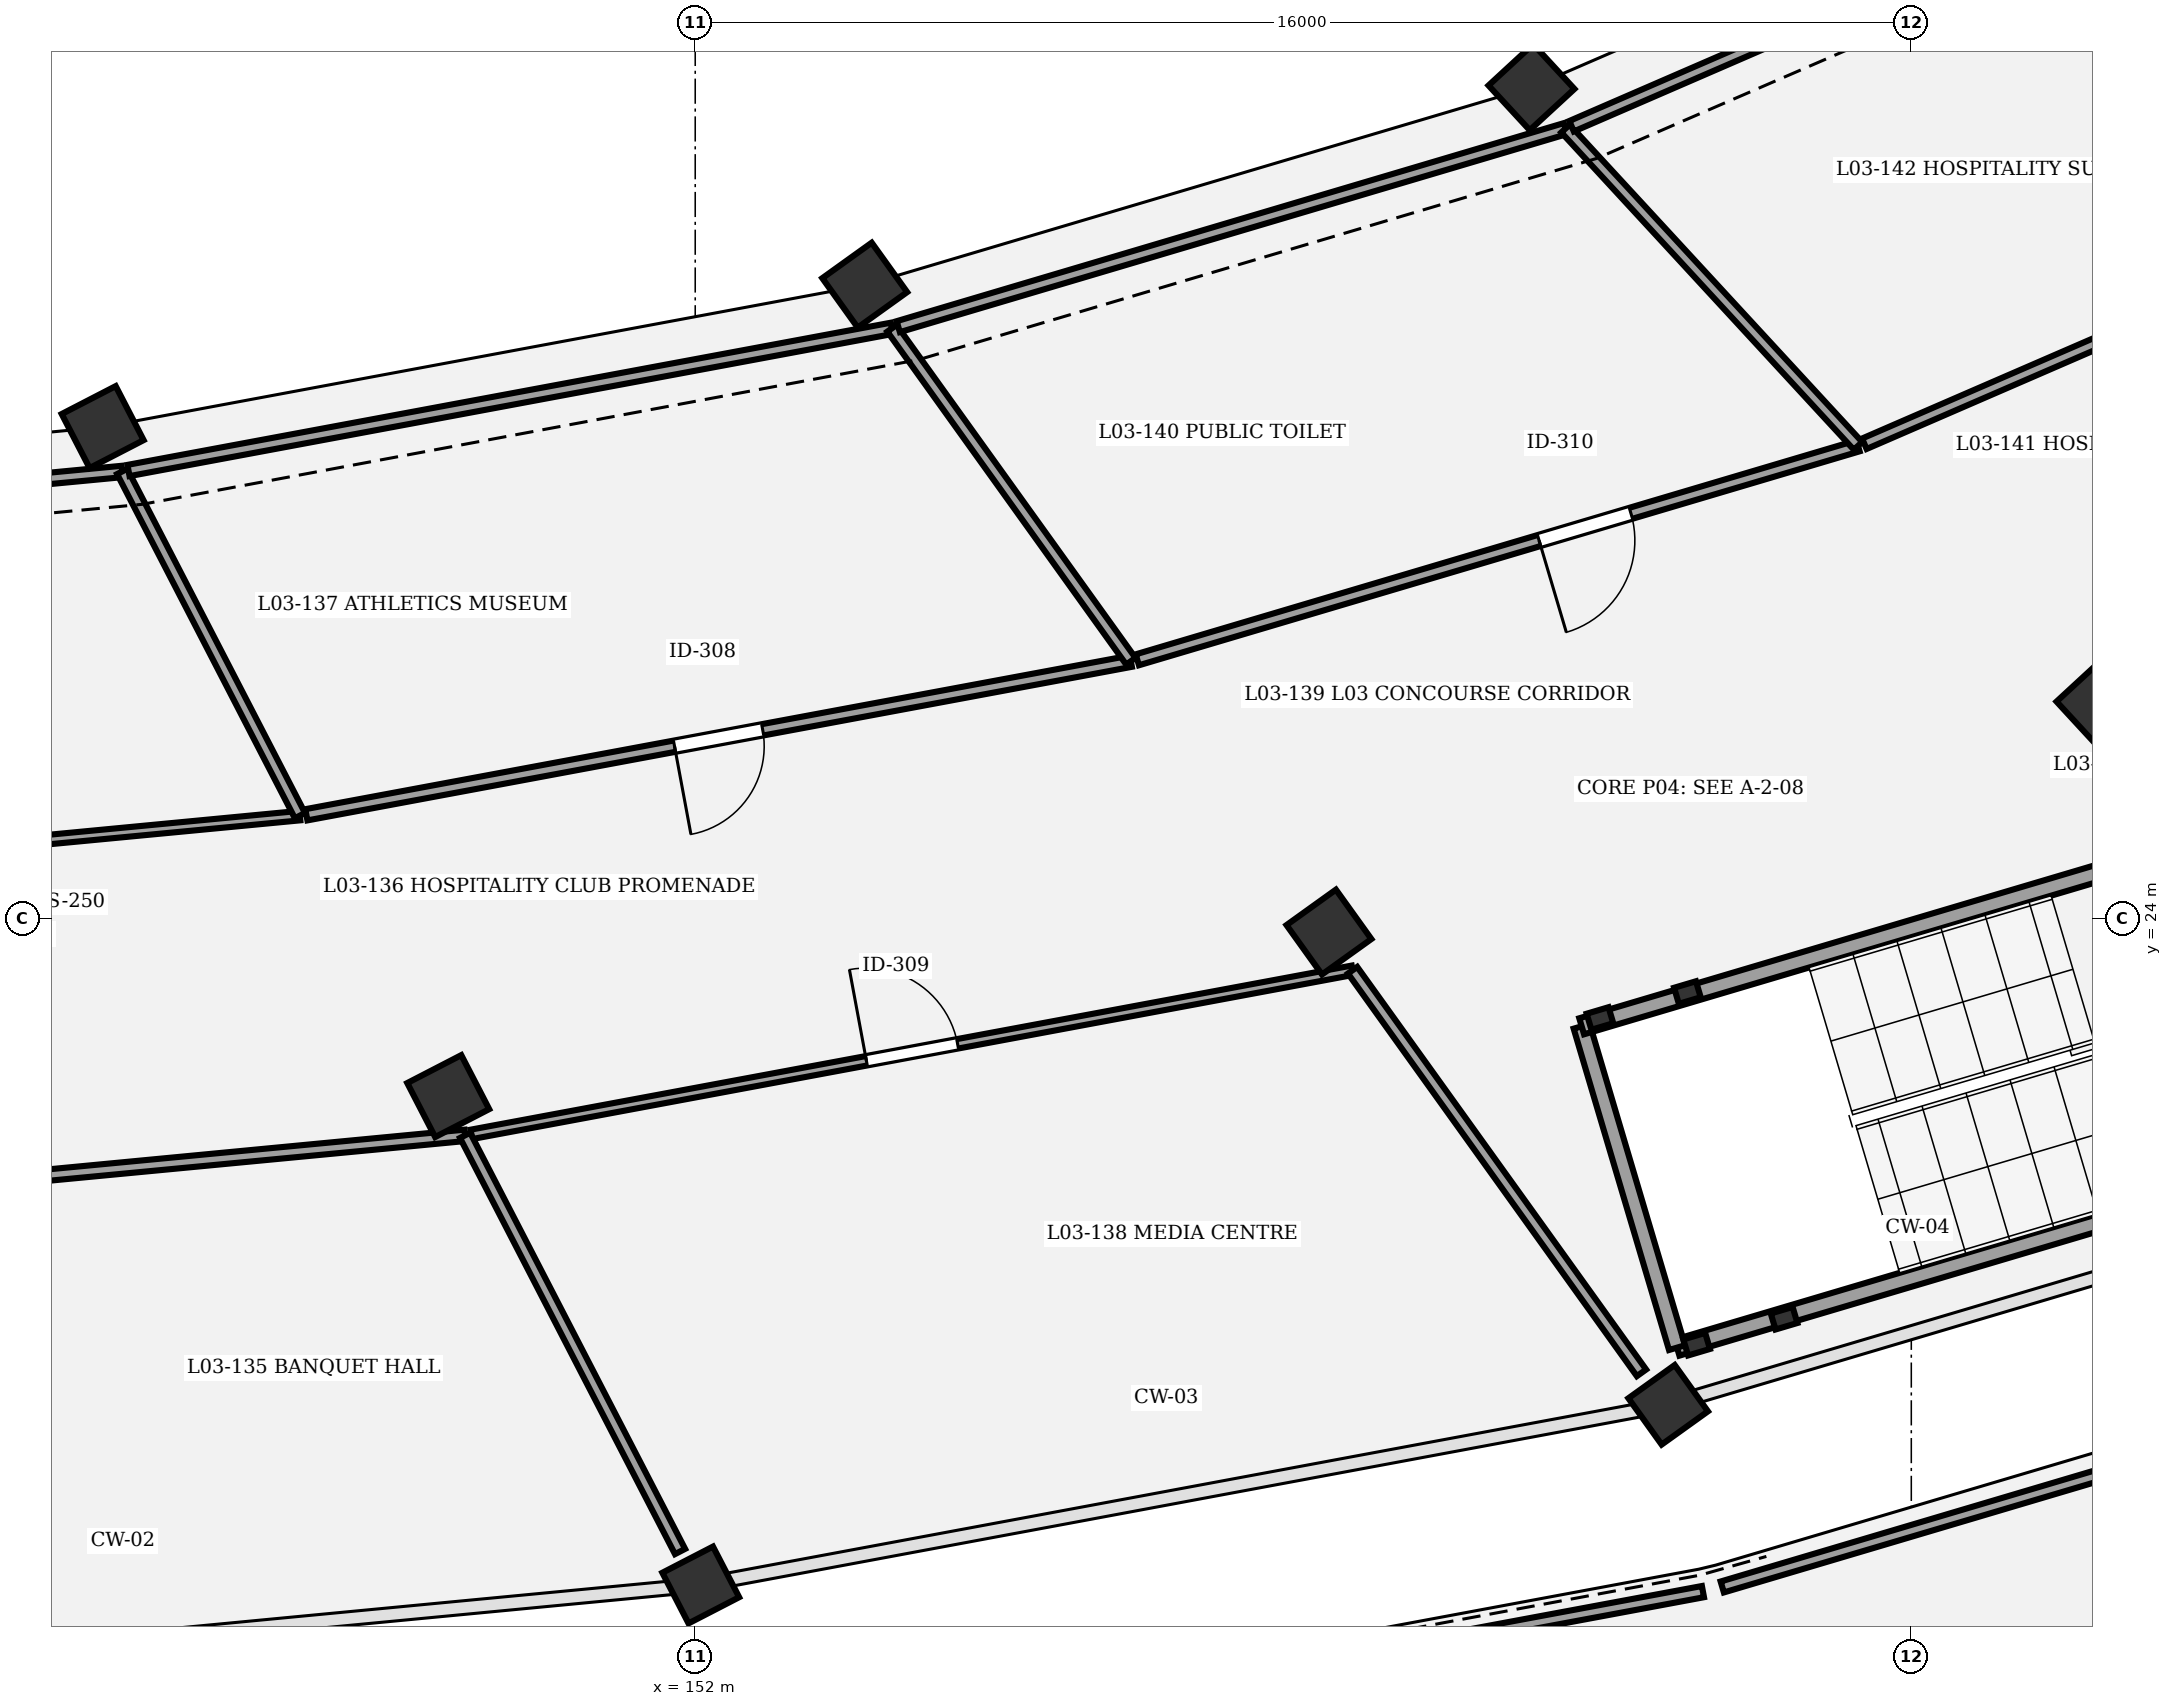
"""IFC4 building model, lengths in metres.
Left out: names, types, materials, properties, quantities, classifications, styles, units other than length and angle.
Written with IfcOpenShell. Run it as: python <this file> out.ifc"""

import sys

from ifc_helpers import new_model, si_unit, direction, frame, frame_2d, origin, origin_2d, place, context, subcontext, project, spatial, rectangle, extrude, element, fill, save


model = new_model("IFC4")
c1 = context("Model", 3, precision=1e-05, world=origin(), true_north=direction((0.0, 1.0)))
c2 = subcontext(c1, "Body", "Model", "MODEL_VIEW")
j1 = project(units=[si_unit("LENGTHUNIT", "METRE"), si_unit("PLANEANGLEUNIT", "RADIAN")], contexts=[c1])
p1 = place(None, origin())
s1 = spatial("IfcSite", under=j1, at=p1, CompositionType="ELEMENT")
p2 = place(p1, origin())
s2 = spatial("IfcBuilding", under=s1, at=p2, CompositionType="ELEMENT")
p3 = place(p2, frame((0.0, 0.0, 14.7)))
s3 = spatial("IfcBuildingStorey", under=s2, at=p3, CompositionType="ELEMENT", Elevation=14.7)
p4 = place(p3, frame((144.204, 30.466, 0.0), z_axis=(0.0, 0.0, 1.0), x_axis=(0.458959712465, -0.888457079624, 0.0)))
e1 = element("IfcColumn", 1, at=p4, inside=s3, PredefinedType="COLUMN", context=c2, shape_type="SweptSolid", body=[
    extrude(rectangle(XDim=0.8, YDim=0.8, at=origin_2d()), origin(), (0.0, 0.0, 1.0), 2.85),
])
p5 = place(p3, frame((148.75, 21.665, 0.0), z_axis=(0.0, 0.0, 1.0), x_axis=(0.458959712465, -0.888457079624, 0.0)))
e2 = element("IfcColumn", 2, at=p5, inside=s3, PredefinedType="COLUMN", context=c2, shape_type="SweptSolid", body=[
    extrude(rectangle(XDim=0.8, YDim=0.8, at=origin_2d()), origin(), (0.0, 0.0, 1.0), 4.5),
])
p6 = place(p3, frame((152.073, 15.233, 0.0), z_axis=(0.0, 0.0, 1.0), x_axis=(0.458959712465, -0.888457079624, 0.0)))
e3 = element("IfcColumn", 3, at=p6, inside=s3, PredefinedType="COLUMN", context=c2, shape_type="SweptSolid", body=[
    extrude(rectangle(XDim=0.75, YDim=0.75, at=origin_2d()), origin(), (0.0, 0.0, 1.0), 4.5),
])
p7 = place(p3, frame((154.23, 32.333, 0.0), z_axis=(0.0, 0.0, 1.0), x_axis=(0.582974127943, -0.812490717577, 0.0)))
e4 = element("IfcColumn", 4, at=p7, inside=s3, PredefinedType="COLUMN", context=c2, shape_type="SweptSolid", body=[
    extrude(rectangle(XDim=0.8, YDim=0.8, at=origin_2d()), origin(), (0.0, 0.0, 1.0), 2.85),
])
p8 = place(p3, frame((160.338, 23.823, 0.0), z_axis=(0.0, 0.0, 1.0), x_axis=(0.582974127943, -0.812490717577, 0.0)))
e5 = element("IfcColumn", 5, at=p8, inside=s3, PredefinedType="COLUMN", context=c2, shape_type="SweptSolid", body=[
    extrude(rectangle(XDim=0.8, YDim=0.8, at=origin_2d()), origin(), (0.0, 0.0, 1.0), 4.5),
])
p9 = place(p3, frame((164.801, 17.603, 0.0), z_axis=(0.0, 0.0, 1.0), x_axis=(0.582974127943, -0.812490717577, 0.0)))
e6 = element("IfcColumn", 6, at=p9, inside=s3, PredefinedType="COLUMN", context=c2, shape_type="SweptSolid", body=[
    extrude(rectangle(XDim=0.75, YDim=0.75, at=origin_2d()), origin(), (0.0, 0.0, 1.0), 4.5),
])
p10 = place(p3, frame((163.003, 34.938, 0.0), z_axis=(0.0, 0.0, 1.0), x_axis=(0.677903094969, -0.735151272753, 0.0)))
e7 = element("IfcColumn", 7, at=p10, inside=s3, PredefinedType="COLUMN", context=c2, shape_type="SweptSolid", body=[
    extrude(rectangle(XDim=0.8, YDim=0.8, at=origin_2d()), origin(), (0.0, 0.0, 1.0), 2.85),
])
p11 = place(p3, frame((170.476, 26.832, 0.0), z_axis=(0.0, 0.0, 1.0), x_axis=(0.677903094969, -0.735151272753, 0.0)))
e8 = element("IfcColumn", 8, at=p11, inside=s3, PredefinedType="COLUMN", context=c2, shape_type="SweptSolid", body=[
    extrude(rectangle(XDim=0.8, YDim=0.8, at=origin_2d()), origin(), (0.0, 0.0, 1.0), 4.5),
])
for number, where, z_axis, x_axis in (
    (9, (165.054, 23.027, 0.0), (0.0, 0.0, 1.0), (-0.959, -0.285, 0.0)),
    (10, (163.904, 22.686, 0.0), (0.0, 0.0, 1.0), (-0.959, -0.285, 0.0)),
    (11, (165.176, 18.4, 0.0), (0.0, 0.0, 1.0), (-0.959, -0.285, 0.0)),
    (12, (166.326, 18.742, 0.0), (0.0, 0.0, 1.0), (-0.959, -0.285, 0.0)),
):
    element("IfcColumn", number, at=place(p3, frame(where, z_axis=z_axis, x_axis=x_axis)), inside=s3, PredefinedType="COLUMN", context=c2, shape_type="SweptSolid", body=[
        extrude(rectangle(XDim=0.3, YDim=0.22, at=origin_2d()), origin(), (0.0, 0.0, 1.0), 4.5),
    ])
p12 = place(p3, frame((173.105, 20.785, 0.0), z_axis=(0.0, 0.0, 1.0), x_axis=(-0.958675743706, -0.284500998997, 0.0)))
e13 = element("IfcWall", 13, at=p12, inside=s3, PredefinedType="SHEAR", context=c2, shape_type="SweptSolid", body=[
    extrude(rectangle(XDim=8.54, YDim=0.22, at=frame_2d((4.27, 0.0))), origin(), (0.0, 0.0, 1.0), 4.25),
])
p13 = place(p3, frame((163.663, 22.583, 0.0), z_axis=(0.0, 0.0, 1.0), x_axis=(0.284497328872, -0.958676832861, 0.0)))
e14 = element("IfcWall", 14, at=p13, inside=s3, PredefinedType="SHEAR", context=c2, shape_type="SweptSolid", body=[
    extrude(rectangle(XDim=4.41, YDim=0.22, at=frame_2d((2.205, 0.0))), origin(), (0.0, 0.0, 1.0), 4.25),
])
p14 = place(p3, frame((171.85, 25.013, 0.0), z_axis=(0.0, 0.0, 1.0), x_axis=(-0.95867342973, -0.284508796227, 0.0)))
e15 = element("IfcWall", 15, at=p14, inside=s3, PredefinedType="SHEAR", context=c2, shape_type="SweptSolid", body=[
    extrude(rectangle(XDim=8.54, YDim=0.22, at=frame_2d((4.27, 0.0))), origin(), (0.0, 0.0, 1.0), 4.25),
])
p15 = place(p14, frame((0.3, 0.0, 0.0)))
e16 = element("IfcOpeningElement", 16, at=p15, cuts=e15, PredefinedType="OPENING", context=c2, shape_type="SweptSolid", body=[
    extrude(rectangle(XDim=1.15, YDim=2.15, at=frame_2d((0.575, 1.075))), frame((0.0, 0.12, 0.0), z_axis=(0.0, -1.0, 0.0), x_axis=(1.0, 0.0, 0.0)), (0.0, 0.0, 1.0), 0.24),
])
p16 = place(p3, frame((146.799, 25.355, 0.0), z_axis=(0.0, 0.0, 1.0), x_axis=(-0.995485111947, -0.094917816515, 0.0)))
e17 = element("IfcWall", 17, at=p16, inside=s3, PredefinedType="PARTITIONING", context=c2, shape_type="SweptSolid", body=[
    extrude(rectangle(XDim=12.822, YDim=0.125, at=frame_2d((6.411, 0.0))), origin(), (0.0, 0.0, 1.0), 3.25),
])
p17 = place(p16, frame((5.861, 0.0, 0.0)))
e18 = element("IfcOpeningElement", 18, at=p17, cuts=e17, PredefinedType="OPENING", context=c2, shape_type="SweptSolid", body=[
    extrude(rectangle(XDim=1.1, YDim=2.2, at=frame_2d((0.55, 1.1))), frame((0.0, 0.073, 0.0), z_axis=(0.0, -1.0, 0.0), x_axis=(1.0, 0.0, 0.0)), (0.0, 0.0, 1.0), 0.145),
])
p18 = place(p3, frame((135.681, 19.881, 0.0), z_axis=(0.0, 0.0, 1.0), x_axis=(0.995484535327, 0.094923863827, 0.0)))
e19 = element("IfcWall", 19, at=p18, inside=s3, PredefinedType="PARTITIONING", context=c2, shape_type="SweptSolid", body=[
    extrude(rectangle(XDim=13.351, YDim=0.15, at=frame_2d((6.676, 0.0))), origin(), (0.0, 0.0, 1.0), 3.25),
])
p19 = place(p18, frame((6.105, 0.0, 0.0)))
e20 = element("IfcOpeningElement", 20, at=p19, cuts=e19, PredefinedType="OPENING", context=c2, shape_type="SweptSolid", body=[
    extrude(rectangle(XDim=1.14, YDim=2.2, at=frame_2d((0.57, 1.1))), frame((0.0, 0.085, 0.0), z_axis=(0.0, -1.0, 0.0), x_axis=(1.0, 0.0, 0.0)), (0.0, 0.0, 1.0), 0.17),
])
p20 = place(p3, frame((157.732, 27.386, 0.0), z_axis=(0.0, 0.0, 1.0), x_axis=(-0.983097372707, -0.183083466695, 0.0)))
e21 = element("IfcWall", 21, at=p20, inside=s3, PredefinedType="PARTITIONING", context=c2, shape_type="SweptSolid", body=[
    extrude(rectangle(XDim=11.035, YDim=0.15, at=frame_2d((5.517, 0.0))), origin(), (0.0, 0.0, 1.0), 3.25),
])
p21 = place(p20, frame((4.927, 0.0, 0.0)))
e22 = element("IfcOpeningElement", 22, at=p21, cuts=e21, PredefinedType="OPENING", context=c2, shape_type="SweptSolid", body=[
    extrude(rectangle(XDim=1.18, YDim=2.2, at=frame_2d((0.59, 1.1))), frame((0.0, 0.085, 0.0), z_axis=(0.0, -1.0, 0.0), x_axis=(1.0, 0.0, 0.0)), (0.0, 0.0, 1.0), 0.17),
])
p22 = place(p3, frame((149.055, 21.161, 0.0), z_axis=(0.0, 0.0, 1.0), x_axis=(0.983095748229, 0.183092189385, 0.0)))
e23 = element("IfcWall", 23, at=p22, inside=s3, PredefinedType="PARTITIONING", context=c2, shape_type="SweptSolid", body=[
    extrude(rectangle(XDim=11.793, YDim=0.125, at=frame_2d((5.896, 0.0))), origin(), (0.0, 0.0, 1.0), 3.25),
])
p23 = place(p22, frame((5.287, 0.0, 0.0)))
e24 = element("IfcOpeningElement", 24, at=p23, cuts=e23, PredefinedType="OPENING", context=c2, shape_type="SweptSolid", body=[
    extrude(rectangle(XDim=1.22, YDim=2.2, at=frame_2d((0.61, 1.1))), frame((0.0, 0.073, 0.0), z_axis=(0.0, -1.0, 0.0), x_axis=(1.0, 0.0, 0.0)), (0.0, 0.0, 1.0), 0.145),
])
p24 = place(p3, frame((167.299, 30.219, 0.0), z_axis=(0.0, 0.0, 1.0), x_axis=(-0.958655809656, -0.284568161629, 0.0)))
e25 = element("IfcWall", 25, at=p24, inside=s3, PredefinedType="PARTITIONING", context=c2, shape_type="SweptSolid", body=[
    extrude(rectangle(XDim=9.891, YDim=0.15, at=frame_2d((4.946, 0.0))), origin(), (0.0, 0.0, 1.0), 3.25),
])
p25 = place(p24, frame((3.117, 0.0, 0.0)))
e26 = element("IfcOpeningElement", 26, at=p25, cuts=e25, PredefinedType="OPENING", context=c2, shape_type="SweptSolid", body=[
    extrude(rectangle(XDim=1.26, YDim=2.2, at=frame_2d((0.63, 1.1))), frame((0.0, 0.085, 0.0), z_axis=(0.0, -1.0, 0.0), x_axis=(1.0, 0.0, 0.0)), (0.0, 0.0, 1.0), 0.17),
])
p26 = place(p3, frame((175.685, 33.846, 0.0), z_axis=(0.0, 0.0, 1.0), x_axis=(-0.917494590455, -0.397748257677, 0.0)))
e27 = element("IfcWall", 27, at=p26, inside=s3, PredefinedType="PARTITIONING", context=c2, shape_type="SweptSolid", body=[
    extrude(rectangle(XDim=9.049, YDim=0.15, at=frame_2d((4.525, 0.0))), origin(), (0.0, 0.0, 1.0), 3.25),
])
p27 = place(p26, frame((1.738, 0.0, 0.0)))
e28 = element("IfcOpeningElement", 28, at=p27, cuts=e27, PredefinedType="OPENING", context=c2, shape_type="SweptSolid", body=[
    extrude(rectangle(XDim=1.32, YDim=2.2, at=frame_2d((0.66, 1.1))), frame((0.0, 0.085, 0.0), z_axis=(0.0, -1.0, 0.0), x_axis=(1.0, 0.0, 0.0)), (0.0, 0.0, 1.0), 0.17),
])
p28 = place(p3, frame((132.64, 28.755, 0.0), z_axis=(0.0, 0.0, 1.0), x_axis=(0.995483914052, 0.094930379031, 0.0)))
e29 = element("IfcWall", 29, at=p28, inside=s3, PredefinedType="PARTITIONING", context=c2, shape_type="SweptSolid", body=[
    extrude(rectangle(XDim=11.874, YDim=0.15, at=frame_2d((5.937, 0.0))), origin(), (0.0, 0.0, 1.0), 3.25),
])
p29 = place(p3, frame((144.46, 29.882, 0.0), z_axis=(0.0, 0.0, 1.0), x_axis=(0.458979714818, -0.888446746511, 0.0)))
e30 = element("IfcWall", 30, at=p29, inside=s3, PredefinedType="PARTITIONING", context=c2, shape_type="SweptSolid", body=[
    extrude(rectangle(XDim=5.096, YDim=0.15, at=frame_2d((2.548, 0.0))), origin(), (0.0, 0.0, 1.0), 3.25),
])
p30 = place(p3, frame((148.972, 21.148, 0.0), z_axis=(0.0, 0.0, 1.0), x_axis=(0.45896480759, -0.888454447563, 0.0)))
e31 = element("IfcWall", 31, at=p30, inside=s3, PredefinedType="PARTITIONING", context=c2, shape_type="SweptSolid", body=[
    extrude(rectangle(XDim=6.163, YDim=0.15, at=frame_2d((3.081, 0.0))), origin(), (0.0, 0.0, 1.0), 3.25),
])
p31 = place(p3, frame((144.544, 29.895, 0.0), z_axis=(0.0, 0.0, 1.0), x_axis=(0.983093557334, 0.183103952795, 0.0)))
e32 = element("IfcWall", 32, at=p31, inside=s3, PredefinedType="PARTITIONING", context=c2, shape_type="SweptSolid", body=[
    extrude(rectangle(XDim=10.218, YDim=0.15, at=frame_2d((5.109, 0.0))), origin(), (0.0, 0.0, 1.0), 3.25),
])
p32 = place(p3, frame((154.588, 31.766, 0.0), z_axis=(0.0, 0.0, 1.0), x_axis=(0.58303590775, -0.812446386092, 0.0)))
e33 = element("IfcWall", 33, at=p32, inside=s3, PredefinedType="PARTITIONING", context=c2, shape_type="SweptSolid", body=[
    extrude(rectangle(XDim=5.391, YDim=0.15, at=frame_2d((2.696, 0.0))), origin(), (0.0, 0.0, 1.0), 3.25),
])
p33 = place(p3, frame((160.649, 23.32, 0.0), z_axis=(0.0, 0.0, 1.0), x_axis=(0.58306104439, -0.812428346696, 0.0)))
e34 = element("IfcWall", 34, at=p33, inside=s3, PredefinedType="PARTITIONING", context=c2, shape_type="SweptSolid", body=[
    extrude(rectangle(XDim=6.52, YDim=0.15, at=frame_2d((3.26, 0.0))), origin(), (0.0, 0.0, 1.0), 3.25),
])
p34 = place(p3, frame((154.671, 31.788, 0.0), z_axis=(0.0, 0.0, 1.0), x_axis=(0.958661639872, 0.284548520005, 0.0)))
e35 = element("IfcWall", 35, at=p34, inside=s3, PredefinedType="PARTITIONING", context=c2, shape_type="SweptSolid", body=[
    extrude(rectangle(XDim=9.157, YDim=0.15, at=frame_2d((4.579, 0.0))), origin(), (0.0, 0.0, 1.0), 3.25),
])
p35 = place(p3, frame((163.45, 34.393, 0.0), z_axis=(0.0, 0.0, 1.0), x_axis=(0.677844218495, -0.735205559999, 0.0)))
e36 = element("IfcWall", 36, at=p35, inside=s3, PredefinedType="PARTITIONING", context=c2, shape_type="SweptSolid", body=[
    extrude(rectangle(XDim=5.678, YDim=0.15, at=frame_2d((2.839, 0.0))), origin(), (0.0, 0.0, 1.0), 3.25),
])
p36 = place(p3, frame((163.53, 34.424, 0.0), z_axis=(0.0, 0.0, 1.0), x_axis=(0.917493946853, 0.397749742286, 0.0)))
e37 = element("IfcWall", 37, at=p36, inside=s3, PredefinedType="PARTITIONING", context=c2, shape_type="SweptSolid", body=[
    extrude(rectangle(XDim=8.377, YDim=0.15, at=frame_2d((4.188, 0.0))), origin(), (0.0, 0.0, 1.0), 3.25),
])
p37 = place(p3, frame((165.513, 15.207, 0.0), z_axis=(0.0, 0.0, 1.0), x_axis=(0.95866000112, 0.284554041006, 0.0)))
e38 = element("IfcWall", 38, at=p37, inside=s3, PredefinedType="PARTITIONING", context=c2, shape_type="SweptSolid", body=[
    extrude(rectangle(XDim=8.478, YDim=0.15, at=frame_2d((4.239, 0.0))), origin(), (0.0, 0.0, 1.0), 3.25),
])
p38 = place(p3, frame((155.924, 13.407, 0.0), z_axis=(0.0, 0.0, 1.0), x_axis=(0.983095301178, 0.183094589766, 0.0)))
e39 = element("IfcWall", 39, at=p38, inside=s3, PredefinedType="PARTITIONING", context=c2, shape_type="SweptSolid", body=[
    extrude(rectangle(XDim=9.495, YDim=0.15, at=frame_2d((4.748, 0.0))), origin(), (0.0, 0.0, 1.0), 3.25),
])
p39 = place(p21, origin())
e40 = element("IfcDoor", 40, at=p39, inside=s3, OperationType="SINGLE_SWING_RIGHT", PredefinedType="DOOR", context=c2, shape_type="SweptSolid", body=[
    extrude(rectangle(XDim=1.18, YDim=2.2, at=frame_2d((0.59, 1.1))), frame((0.0, 0.025, 0.0), z_axis=(0.0, -1.0, 0.0), x_axis=(1.0, 0.0, 0.0)), (0.0, 0.0, 1.0), 0.05),
])
fill(e22, e40)
p40 = place(p23, origin())
e41 = element("IfcDoor", 41, at=p40, inside=s3, OperationType="SINGLE_SWING_LEFT", PredefinedType="DOOR", context=c2, shape_type="SweptSolid", body=[
    extrude(rectangle(XDim=1.22, YDim=2.2, at=frame_2d((0.61, 1.1))), frame((0.0, 0.025, 0.0), z_axis=(0.0, -1.0, 0.0), x_axis=(1.0, 0.0, 0.0)), (0.0, 0.0, 1.0), 0.05),
])
fill(e24, e41)
p41 = place(p25, origin())
e42 = element("IfcDoor", 42, at=p41, inside=s3, OperationType="SINGLE_SWING_RIGHT", PredefinedType="DOOR", context=c2, shape_type="SweptSolid", body=[
    extrude(rectangle(XDim=1.26, YDim=2.2, at=frame_2d((0.63, 1.1))), frame((0.0, 0.025, 0.0), z_axis=(0.0, -1.0, 0.0), x_axis=(1.0, 0.0, 0.0)), (0.0, 0.0, 1.0), 0.05),
])
fill(e26, e42)
save(model, sys.argv[1])
